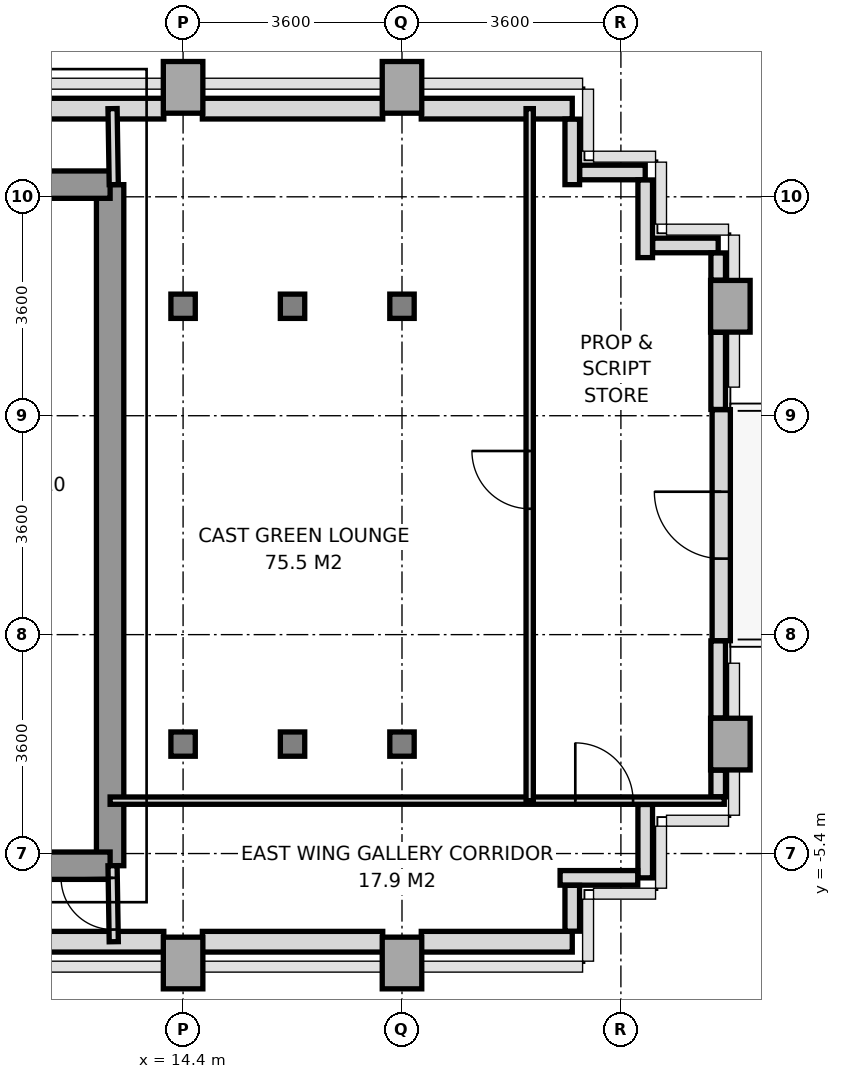
"""IFC4 building model, lengths in metres.
Left out: names, types, materials, properties, quantities, classifications, styles, units other than length and angle.
Written with IfcOpenShell. Run it as: python <this file> out.ifc"""

import sys

from ifc_helpers import new_model, si_unit, direction, frame, frame_2d, origin, origin_2d, place, context, subcontext, project, spatial, rectangle, i_section, extrude, source, transform, mapped, element, fill, save


model = new_model("IFC4")
c1 = context("Model", 3, precision=1e-05, world=origin(), true_north=direction((0.0, 1.0)))
c2 = subcontext(c1, "Body", "Model", "MODEL_VIEW")
j1 = project(units=[si_unit("LENGTHUNIT", "METRE"), si_unit("PLANEANGLEUNIT", "RADIAN")], contexts=[c1])
p1 = place(None, origin())
s1 = spatial("IfcSite", under=j1, at=p1, CompositionType="ELEMENT")
p2 = place(p1, origin())
s2 = spatial("IfcBuilding", under=s1, at=p2, CompositionType="ELEMENT")
p3 = place(p2, frame((0.0, 0.0, 107.4)))
s3 = spatial("IfcBuildingStorey", under=s2, at=p3, CompositionType="ELEMENT", Elevation=107.4)
m1 = source(origin(), c2, "Body", "SweptSolid", [
    extrude(rectangle(XDim=0.65, YDim=0.85, at=origin_2d()), origin(), (0.0, 0.0, 1.0), 3.2),
])
p4 = place(p3, frame((14.4, -7.2, 0.0), z_axis=(0.0, 0.0, 1.0), x_axis=(1.0, 0.0, 0.0)))
e1 = element("IfcColumn", 1, at=p4, inside=s3, PredefinedType="COLUMN", context=c2, shape_type="MappedRepresentation", body=[
    mapped(m1, transform((0.0, 0.0, 0.0), x_axis=(1.0, 0.0, 0.0), y_axis=(0.0, 1.0, 0.0), z_axis=(0.0, 0.0, 1.0), scale=1.0)),
])
m2 = source(origin(), c2, "Body", "SweptSolid", [
    extrude(i_section(OverallWidth=0.401, OverallDepth=0.399, WebThickness=0.02, FlangeThickness=0.032, at=origin_2d()), origin(), (0.0, 0.0, 1.0), 3.2),
])
for number, where, z_axis, x_axis in (
    (2, (14.4, -3.6, 0.0), (0.0, 0.0, 1.0), (1.0, 0.0, 0.0)),
    (3, (14.4, 3.6, 0.0), (0.0, 0.0, 1.0), (1.0, 0.0, 0.0)),
):
    element("IfcColumn", number, at=place(p3, frame(where, z_axis=z_axis, x_axis=x_axis)), inside=s3, PredefinedType="COLUMN", context=c2, shape_type="MappedRepresentation", body=[
        mapped(m2, transform((0.0, 0.0, 0.0), x_axis=(1.0, 0.0, 0.0), y_axis=(0.0, 1.0, 0.0), z_axis=(0.0, 0.0, 1.0), scale=1.0)),
    ])
p5 = place(p3, frame((14.4, 7.2, 0.0), z_axis=(0.0, 0.0, 1.0), x_axis=(1.0, 0.0, 0.0)))
e4 = element("IfcColumn", 4, at=p5, inside=s3, PredefinedType="COLUMN", context=c2, shape_type="MappedRepresentation", body=[
    mapped(m1, transform((0.0, 0.0, 0.0), x_axis=(1.0, 0.0, 0.0), y_axis=(0.0, 1.0, 0.0), z_axis=(0.0, 0.0, 1.0), scale=1.0)),
])
for number, where, z_axis, x_axis in (
    (5, (16.2, -3.6, 0.0), (0.0, 0.0, 1.0), (1.0, 0.0, 0.0)),
    (6, (16.2, 3.6, 0.0), (0.0, 0.0, 1.0), (1.0, 0.0, 0.0)),
):
    element("IfcColumn", number, at=place(p3, frame(where, z_axis=z_axis, x_axis=x_axis)), inside=s3, PredefinedType="COLUMN", context=c2, shape_type="MappedRepresentation", body=[
        mapped(m2, transform((0.0, 0.0, 0.0), x_axis=(1.0, 0.0, 0.0), y_axis=(0.0, 1.0, 0.0), z_axis=(0.0, 0.0, 1.0), scale=1.0)),
    ])
p6 = place(p3, frame((18.0, -7.2, 0.0), z_axis=(0.0, 0.0, 1.0), x_axis=(1.0, 0.0, 0.0)))
e7 = element("IfcColumn", 7, at=p6, inside=s3, PredefinedType="COLUMN", context=c2, shape_type="MappedRepresentation", body=[
    mapped(m1, transform((0.0, 0.0, 0.0), x_axis=(1.0, 0.0, 0.0), y_axis=(0.0, 1.0, 0.0), z_axis=(0.0, 0.0, 1.0), scale=1.0)),
])
for number, where, z_axis, x_axis in (
    (8, (18.0, -3.6, 0.0), (0.0, 0.0, 1.0), (1.0, 0.0, 0.0)),
    (9, (18.0, 3.6, 0.0), (0.0, 0.0, 1.0), (1.0, 0.0, 0.0)),
):
    element("IfcColumn", number, at=place(p3, frame(where, z_axis=z_axis, x_axis=x_axis)), inside=s3, PredefinedType="COLUMN", context=c2, shape_type="MappedRepresentation", body=[
        mapped(m2, transform((0.0, 0.0, 0.0), x_axis=(1.0, 0.0, 0.0), y_axis=(0.0, 1.0, 0.0), z_axis=(0.0, 0.0, 1.0), scale=1.0)),
    ])
for number, where, z_axis, x_axis in (
    (10, (18.0, 7.2, 0.0), (0.0, 0.0, 1.0), (1.0, 0.0, 0.0)),
    (11, (23.4, -3.6, 0.0), (0.0, 0.0, 1.0), (1.0, 0.0, 0.0)),
    (12, (23.4, 3.6, 0.0), (0.0, 0.0, 1.0), (1.0, 0.0, 0.0)),
):
    element("IfcColumn", number, at=place(p3, frame(where, z_axis=z_axis, x_axis=x_axis)), inside=s3, PredefinedType="COLUMN", context=c2, shape_type="MappedRepresentation", body=[
        mapped(m1, transform((0.0, 0.0, 0.0), x_axis=(1.0, 0.0, 0.0), y_axis=(0.0, 1.0, 0.0), z_axis=(0.0, 0.0, 1.0), scale=1.0)),
    ])
p7 = place(p3, frame((11.498, 6.85, 0.0), z_axis=(0.0, 0.0, 1.0), x_axis=(1.0, 0.0, 0.0)))
e13 = element("IfcWall", 13, at=p7, inside=s3, PredefinedType="SOLIDWALL", context=c2, shape_type="SweptSolid", body=[
    extrude(rectangle(XDim=2.585, YDim=0.34, at=frame_2d((1.292, 0.0))), origin(), (0.0, 0.0, 1.0), 3.2),
])
p8 = place(p3, frame((14.717, 6.85, 0.0), z_axis=(0.0, 0.0, 1.0), x_axis=(1.0, 0.0, 0.0)))
e14 = element("IfcWall", 14, at=p8, inside=s3, PredefinedType="SOLIDWALL", context=c2, shape_type="SweptSolid", body=[
    extrude(rectangle(XDim=2.966, YDim=0.34, at=frame_2d((1.483, 0.0))), origin(), (0.0, 0.0, 1.0), 2.45),
])
p9 = place(p3, frame((18.317, 6.85, 0.0), z_axis=(0.0, 0.0, 1.0), x_axis=(1.0, 0.0, 0.0)))
e15 = element("IfcWall", 15, at=p9, inside=s3, PredefinedType="SOLIDWALL", context=c2, shape_type="SweptSolid", body=[
    extrude(rectangle(XDim=2.483, YDim=0.34, at=frame_2d((1.242, 0.0))), origin(), (0.0, 0.0, 1.0), 3.2),
])
p10 = place(p3, frame((11.75, -6.85, 0.0), z_axis=(0.0, 0.0, 1.0), x_axis=(1.0, 0.0, 0.0)))
e16 = element("IfcWall", 16, at=p10, inside=s3, PredefinedType="SOLIDWALL", context=c2, shape_type="SweptSolid", body=[
    extrude(rectangle(XDim=2.333, YDim=0.34, at=frame_2d((1.167, 0.0))), origin(), (0.0, 0.0, 1.0), 3.2),
])
p11 = place(p3, frame((14.717, -6.85, 0.0), z_axis=(0.0, 0.0, 1.0), x_axis=(1.0, 0.0, 0.0)))
e17 = element("IfcWall", 17, at=p11, inside=s3, PredefinedType="SOLIDWALL", context=c2, shape_type="SweptSolid", body=[
    extrude(rectangle(XDim=2.966, YDim=0.34, at=frame_2d((1.483, 0.0))), origin(), (0.0, 0.0, 1.0), 2.45),
])
p12 = place(p3, frame((18.317, -6.85, 0.0), z_axis=(0.0, 0.0, 1.0), x_axis=(1.0, 0.0, 0.0)))
e18 = element("IfcWall", 18, at=p12, inside=s3, PredefinedType="SOLIDWALL", context=c2, shape_type="SweptSolid", body=[
    extrude(rectangle(XDim=2.483, YDim=0.34, at=frame_2d((1.242, 0.0))), origin(), (0.0, 0.0, 1.0), 3.2),
])
p13 = place(p3, frame((23.25, -1.9, 0.0), z_axis=(0.0, 0.0, 1.0), x_axis=(0.0, 1.0, 0.0)))
e19 = element("IfcWall", 19, at=p13, inside=s3, PredefinedType="SOLIDWALL", context=c2, shape_type="SweptSolid", body=[
    extrude(rectangle(XDim=3.8, YDim=0.3, at=frame_2d((1.9, 0.0))), origin(), (0.0, 0.0, 1.0), 2.45),
])
p14 = place(p13, frame((1.35, 0.0, 0.0)))
e20 = element("IfcOpeningElement", 20, at=p14, cuts=e19, PredefinedType="OPENING", context=c2, shape_type="SweptSolid", body=[
    extrude(rectangle(XDim=1.1, YDim=2.3, at=frame_2d((0.55, 1.15))), frame((0.0, 0.16, 0.0), z_axis=(0.0, -1.0, 0.0), x_axis=(1.0, 0.0, 0.0)), (0.0, 0.0, 1.0), 0.32),
])
p15 = place(p3, frame((22.0, -4.593, 0.0), z_axis=(0.0, 0.0, 1.0), x_axis=(0.0, -1.0, 0.0)))
e21 = element("IfcWall", 21, at=p15, inside=s3, PredefinedType="PARAPET", context=c2, shape_type="SweptSolid", body=[
    extrude(rectangle(XDim=1.207, YDim=0.24, at=frame_2d((0.604, 0.0))), origin(), (0.0, 0.0, 1.0), 1.15),
])
p16 = place(p3, frame((21.877, -5.8, 0.0), z_axis=(0.0, 0.0, 1.0), x_axis=(-1.0, 0.0, 0.0)))
e22 = element("IfcWall", 22, at=p16, inside=s3, PredefinedType="PARAPET", context=c2, shape_type="SweptSolid", body=[
    extrude(rectangle(XDim=1.277, YDim=0.24, at=frame_2d((0.638, 0.0))), origin(), (0.0, 0.0, 1.0), 1.15),
])
p17 = place(p3, frame((20.8, -5.923, 0.0), z_axis=(0.0, 0.0, 1.0), x_axis=(0.0, -1.0, 0.0)))
e23 = element("IfcWall", 23, at=p17, inside=s3, PredefinedType="PARAPET", context=c2, shape_type="SweptSolid", body=[
    extrude(rectangle(XDim=0.754, YDim=0.24, at=frame_2d((0.377, 0.0))), origin(), (0.0, 0.0, 1.0), 1.15),
])
for number, where, z_axis, x_axis in (
    (24, (20.8, 6.677, 0.0), (0.0, 0.0, 1.0), (0.0, -1.0, 0.0)),
    (25, (20.923, 5.8, 0.0), (0.0, 0.0, 1.0), (1.0, 0.0, 0.0)),
):
    element("IfcWall", number, at=place(p3, frame(where, z_axis=z_axis, x_axis=x_axis)), inside=s3, PredefinedType="PARAPET", context=c2, shape_type="SweptSolid", body=[
        extrude(rectangle(XDim=1.077, YDim=0.24, at=frame_2d((0.539, 0.0))), origin(), (0.0, 0.0, 1.0), 1.15),
    ])
p18 = place(p3, frame((22.0, 5.677, 0.0), z_axis=(0.0, 0.0, 1.0), x_axis=(0.0, -1.0, 0.0)))
e26 = element("IfcWall", 26, at=p18, inside=s3, PredefinedType="PARAPET", context=c2, shape_type="SweptSolid", body=[
    extrude(rectangle(XDim=1.277, YDim=0.24, at=frame_2d((0.639, 0.0))), origin(), (0.0, 0.0, 1.0), 1.15),
])
p19 = place(p3, frame((22.123, 4.6, 0.0), z_axis=(0.0, 0.0, 1.0), x_axis=(1.0, 0.0, 0.0)))
e27 = element("IfcWall", 27, at=p19, inside=s3, PredefinedType="PARAPET", context=c2, shape_type="SweptSolid", body=[
    extrude(rectangle(XDim=1.077, YDim=0.24, at=frame_2d((0.539, 0.0))), origin(), (0.0, 0.0, 1.0), 1.15),
])
p20 = place(p3, frame((23.2, 4.477, 0.0), z_axis=(0.0, 0.0, 1.0), x_axis=(0.0, -1.0, 0.0)))
e28 = element("IfcWall", 28, at=p20, inside=s3, PredefinedType="PARAPET", context=c2, shape_type="SweptSolid", body=[
    extrude(rectangle(XDim=0.449, YDim=0.24, at=frame_2d((0.225, 0.0))), origin(), (0.0, 0.0, 1.0), 1.15),
])
for number, where, z_axis, x_axis in (
    (29, (23.2, 3.172, 0.0), (0.0, 0.0, 1.0), (0.0, -1.0, 0.0)),
    (30, (23.2, -1.903, 0.0), (0.0, 0.0, 1.0), (0.0, -1.0, 0.0)),
):
    element("IfcWall", number, at=place(p3, frame(where, z_axis=z_axis, x_axis=x_axis)), inside=s3, PredefinedType="PARAPET", context=c2, shape_type="SweptSolid", body=[
        extrude(rectangle(XDim=1.269, YDim=0.24, at=frame_2d((0.635, 0.0))), origin(), (0.0, 0.0, 1.0), 1.15),
    ])
p21 = place(p3, frame((23.2, -4.028, 0.0), z_axis=(0.0, 0.0, 1.0), x_axis=(0.0, -1.0, 0.0)))
e31 = element("IfcWall", 31, at=p21, inside=s3, PredefinedType="PARAPET", context=c2, shape_type="SweptSolid", body=[
    extrude(rectangle(XDim=0.439, YDim=0.24, at=frame_2d((0.219, 0.0))), origin(), (0.0, 0.0, 1.0), 1.15),
])
p22 = place(p3, frame((13.2, -5.6, 0.0), z_axis=(0.0, 0.0, 1.0), x_axis=(0.0, 1.0, 0.0)))
e32 = element("IfcWall", 32, at=p22, inside=s3, PredefinedType="SHEAR", context=c2, shape_type="SweptSolid", body=[
    extrude(rectangle(XDim=11.2, YDim=0.45, at=frame_2d((5.6, 0.0))), origin(), (0.0, 0.0, 1.0), 3.2),
])
p23 = place(p3, frame((11.381, 5.6, 0.0), z_axis=(0.0, 0.0, 1.0), x_axis=(1.0, 0.0, 0.0)))
e33 = element("IfcWall", 33, at=p23, inside=s3, PredefinedType="SHEAR", context=c2, shape_type="SweptSolid", body=[
    extrude(rectangle(XDim=1.819, YDim=0.45, at=frame_2d((0.909, 0.0))), origin(), (0.0, 0.0, 1.0), 3.2),
])
p24 = place(p3, frame((5.4, -5.6, 0.0), z_axis=(0.0, 0.0, 1.0), x_axis=(1.0, 0.0, 0.0)))
e34 = element("IfcWall", 34, at=p24, inside=s3, PredefinedType="SHEAR", context=c2, shape_type="SweptSolid", body=[
    extrude(rectangle(XDim=7.8, YDim=0.45, at=frame_2d((3.9, 0.0))), origin(), (0.0, 0.0, 1.0), 3.2),
])
p25 = place(p24, frame((3.0, 0.0, 0.0)))
e35 = element("IfcOpeningElement", 35, at=p25, cuts=e34, PredefinedType="OPENING", context=c2, shape_type="SweptSolid", body=[
    extrude(rectangle(XDim=1.2, YDim=2.2, at=frame_2d((0.6, 1.1))), frame((0.0, 0.235, 0.0), z_axis=(0.0, -1.0, 0.0), x_axis=(1.0, 0.0, 0.0)), (0.0, 0.0, 1.0), 0.47),
])
p26 = place(p3, frame((13.26, 5.6, 0.0), z_axis=(0.0, 0.0, 1.0), x_axis=(-0.016013571389, 0.999871774545, 0.0)))
e36 = element("IfcWall", 36, at=p26, inside=s3, PredefinedType="PARTITIONING", context=c2, shape_type="SweptSolid", body=[
    extrude(rectangle(XDim=1.25, YDim=0.15, at=frame_2d((0.625, 0.0))), origin(), (0.0, 0.0, 1.0), 3.2),
])
p27 = place(p3, frame((13.26, -6.85, 0.0), z_axis=(0.0, 0.0, 1.0), x_axis=(-0.016013571389, 0.999871774545, 0.0)))
e37 = element("IfcWall", 37, at=p27, inside=s3, PredefinedType="PARTITIONING", context=c2, shape_type="SweptSolid", body=[
    extrude(rectangle(XDim=1.25, YDim=0.15, at=frame_2d((0.625, 0.0))), origin(), (0.0, 0.0, 1.0), 3.2),
])
p28 = place(p27, frame((0.2, 0.0, 0.0)))
e38 = element("IfcOpeningElement", 38, at=p28, cuts=e37, PredefinedType="OPENING", context=c2, shape_type="SweptSolid", body=[
    extrude(rectangle(XDim=0.85, YDim=2.1, at=frame_2d((0.425, 1.05))), frame((0.0, 0.085, 0.0), z_axis=(0.0, -1.0, 0.0), x_axis=(1.0, 0.0, 0.0)), (0.0, 0.0, 1.0), 0.17),
])
p29 = place(p3, frame((13.2, -4.53, 0.0), z_axis=(0.0, 0.0, 1.0), x_axis=(1.0, 0.0, 0.0)))
e39 = element("IfcWall", 39, at=p29, inside=s3, PredefinedType="PARTITIONING", context=c2, shape_type="SweptSolid", body=[
    extrude(rectangle(XDim=10.1, YDim=0.12, at=frame_2d((5.05, 0.0))), origin(), (0.0, 0.0, 1.0), 2.75),
])
p30 = place(p29, frame((7.65, 0.0, 0.0)))
e40 = element("IfcOpeningElement", 40, at=p30, cuts=e39, PredefinedType="OPENING", context=c2, shape_type="SweptSolid", body=[
    extrude(rectangle(XDim=0.95, YDim=2.15, at=frame_2d((0.475, 1.075))), frame((0.0, 0.07, 0.0), z_axis=(0.0, -1.0, 0.0), x_axis=(1.0, 0.0, 0.0)), (0.0, 0.0, 1.0), 0.14),
])
p31 = place(p3, frame((20.1, -4.53, 0.0), z_axis=(0.0, 0.0, 1.0), x_axis=(0.0, 1.0, 0.0)))
e41 = element("IfcWall", 41, at=p31, inside=s3, PredefinedType="PARTITIONING", context=c2, shape_type="SweptSolid", body=[
    extrude(rectangle(XDim=11.38, YDim=0.12, at=frame_2d((5.69, 0.0))), origin(), (0.0, 0.0, 1.0), 2.7),
])
p32 = place(p31, frame((4.8, 0.0, 0.0)))
e42 = element("IfcOpeningElement", 42, at=p32, cuts=e41, PredefinedType="OPENING", context=c2, shape_type="SweptSolid", body=[
    extrude(rectangle(XDim=0.95, YDim=2.15, at=frame_2d((0.475, 1.075))), frame((0.0, 0.07, 0.0), z_axis=(0.0, -1.0, 0.0), x_axis=(1.0, 0.0, 0.0)), (0.0, 0.0, 1.0), 0.14),
])
m3 = source(origin(), c2, "Body", "SweptSolid", [
    extrude(rectangle(XDim=1.1, YDim=2.3, at=frame_2d((0.55, 1.15))), frame((0.0, 0.025, 0.0), z_axis=(0.0, -1.0, 0.0), x_axis=(1.0, 0.0, 0.0)), (0.0, 0.0, 1.0), 0.05),
])
p33 = place(p14, frame((1.1, 0.0, 0.0), z_axis=(0.0, 0.0, 1.0), x_axis=(-1.0, 0.0, 0.0)))
e43 = element("IfcDoor", 43, at=p33, inside=s3, OperationType="SINGLE_SWING_RIGHT", PredefinedType="DOOR", context=c2, shape_type="MappedRepresentation", body=[
    mapped(m3, transform((0.0, 0.0, 0.0), x_axis=(1.0, 0.0, 0.0), y_axis=(0.0, 1.0, 0.0), z_axis=(0.0, 0.0, 1.0), scale=1.0)),
])
fill(e20, e43)
m4 = source(origin(), c2, "Body", "SweptSolid", [
    extrude(rectangle(XDim=0.85, YDim=2.1, at=frame_2d((0.425, 1.05))), frame((0.0, 0.025, 0.0), z_axis=(0.0, -1.0, 0.0), x_axis=(1.0, 0.0, 0.0)), (0.0, 0.0, 1.0), 0.05),
])
p34 = place(p28, origin())
e44 = element("IfcDoor", 44, at=p34, inside=s3, OperationType="SINGLE_SWING_RIGHT", PredefinedType="DOOR", context=c2, shape_type="MappedRepresentation", body=[
    mapped(m4, transform((0.0, 0.0, 0.0), x_axis=(1.0, 0.0, 0.0), y_axis=(0.0, 1.0, 0.0), z_axis=(0.0, 0.0, 1.0), scale=1.0)),
])
fill(e38, e44)
m5 = source(origin(), c2, "Body", "SweptSolid", [
    extrude(rectangle(XDim=0.95, YDim=2.15, at=frame_2d((0.475, 1.075))), frame((0.0, 0.025, 0.0), z_axis=(0.0, -1.0, 0.0), x_axis=(1.0, 0.0, 0.0)), (0.0, 0.0, 1.0), 0.05),
])
p35 = place(p30, origin())
e45 = element("IfcDoor", 45, at=p35, inside=s3, OperationType="SINGLE_SWING_LEFT", PredefinedType="DOOR", context=c2, shape_type="MappedRepresentation", body=[
    mapped(m5, transform((0.0, 0.0, 0.0), x_axis=(1.0, 0.0, 0.0), y_axis=(0.0, 1.0, 0.0), z_axis=(0.0, 0.0, 1.0), scale=1.0)),
])
fill(e40, e45)
p36 = place(p32, origin())
e46 = element("IfcDoor", 46, at=p36, inside=s3, OperationType="SINGLE_SWING_RIGHT", PredefinedType="DOOR", context=c2, shape_type="MappedRepresentation", body=[
    mapped(m5, transform((0.0, 0.0, 0.0), x_axis=(1.0, 0.0, 0.0), y_axis=(0.0, 1.0, 0.0), z_axis=(0.0, 0.0, 1.0), scale=1.0)),
])
fill(e42, e46)
save(model, sys.argv[1])
